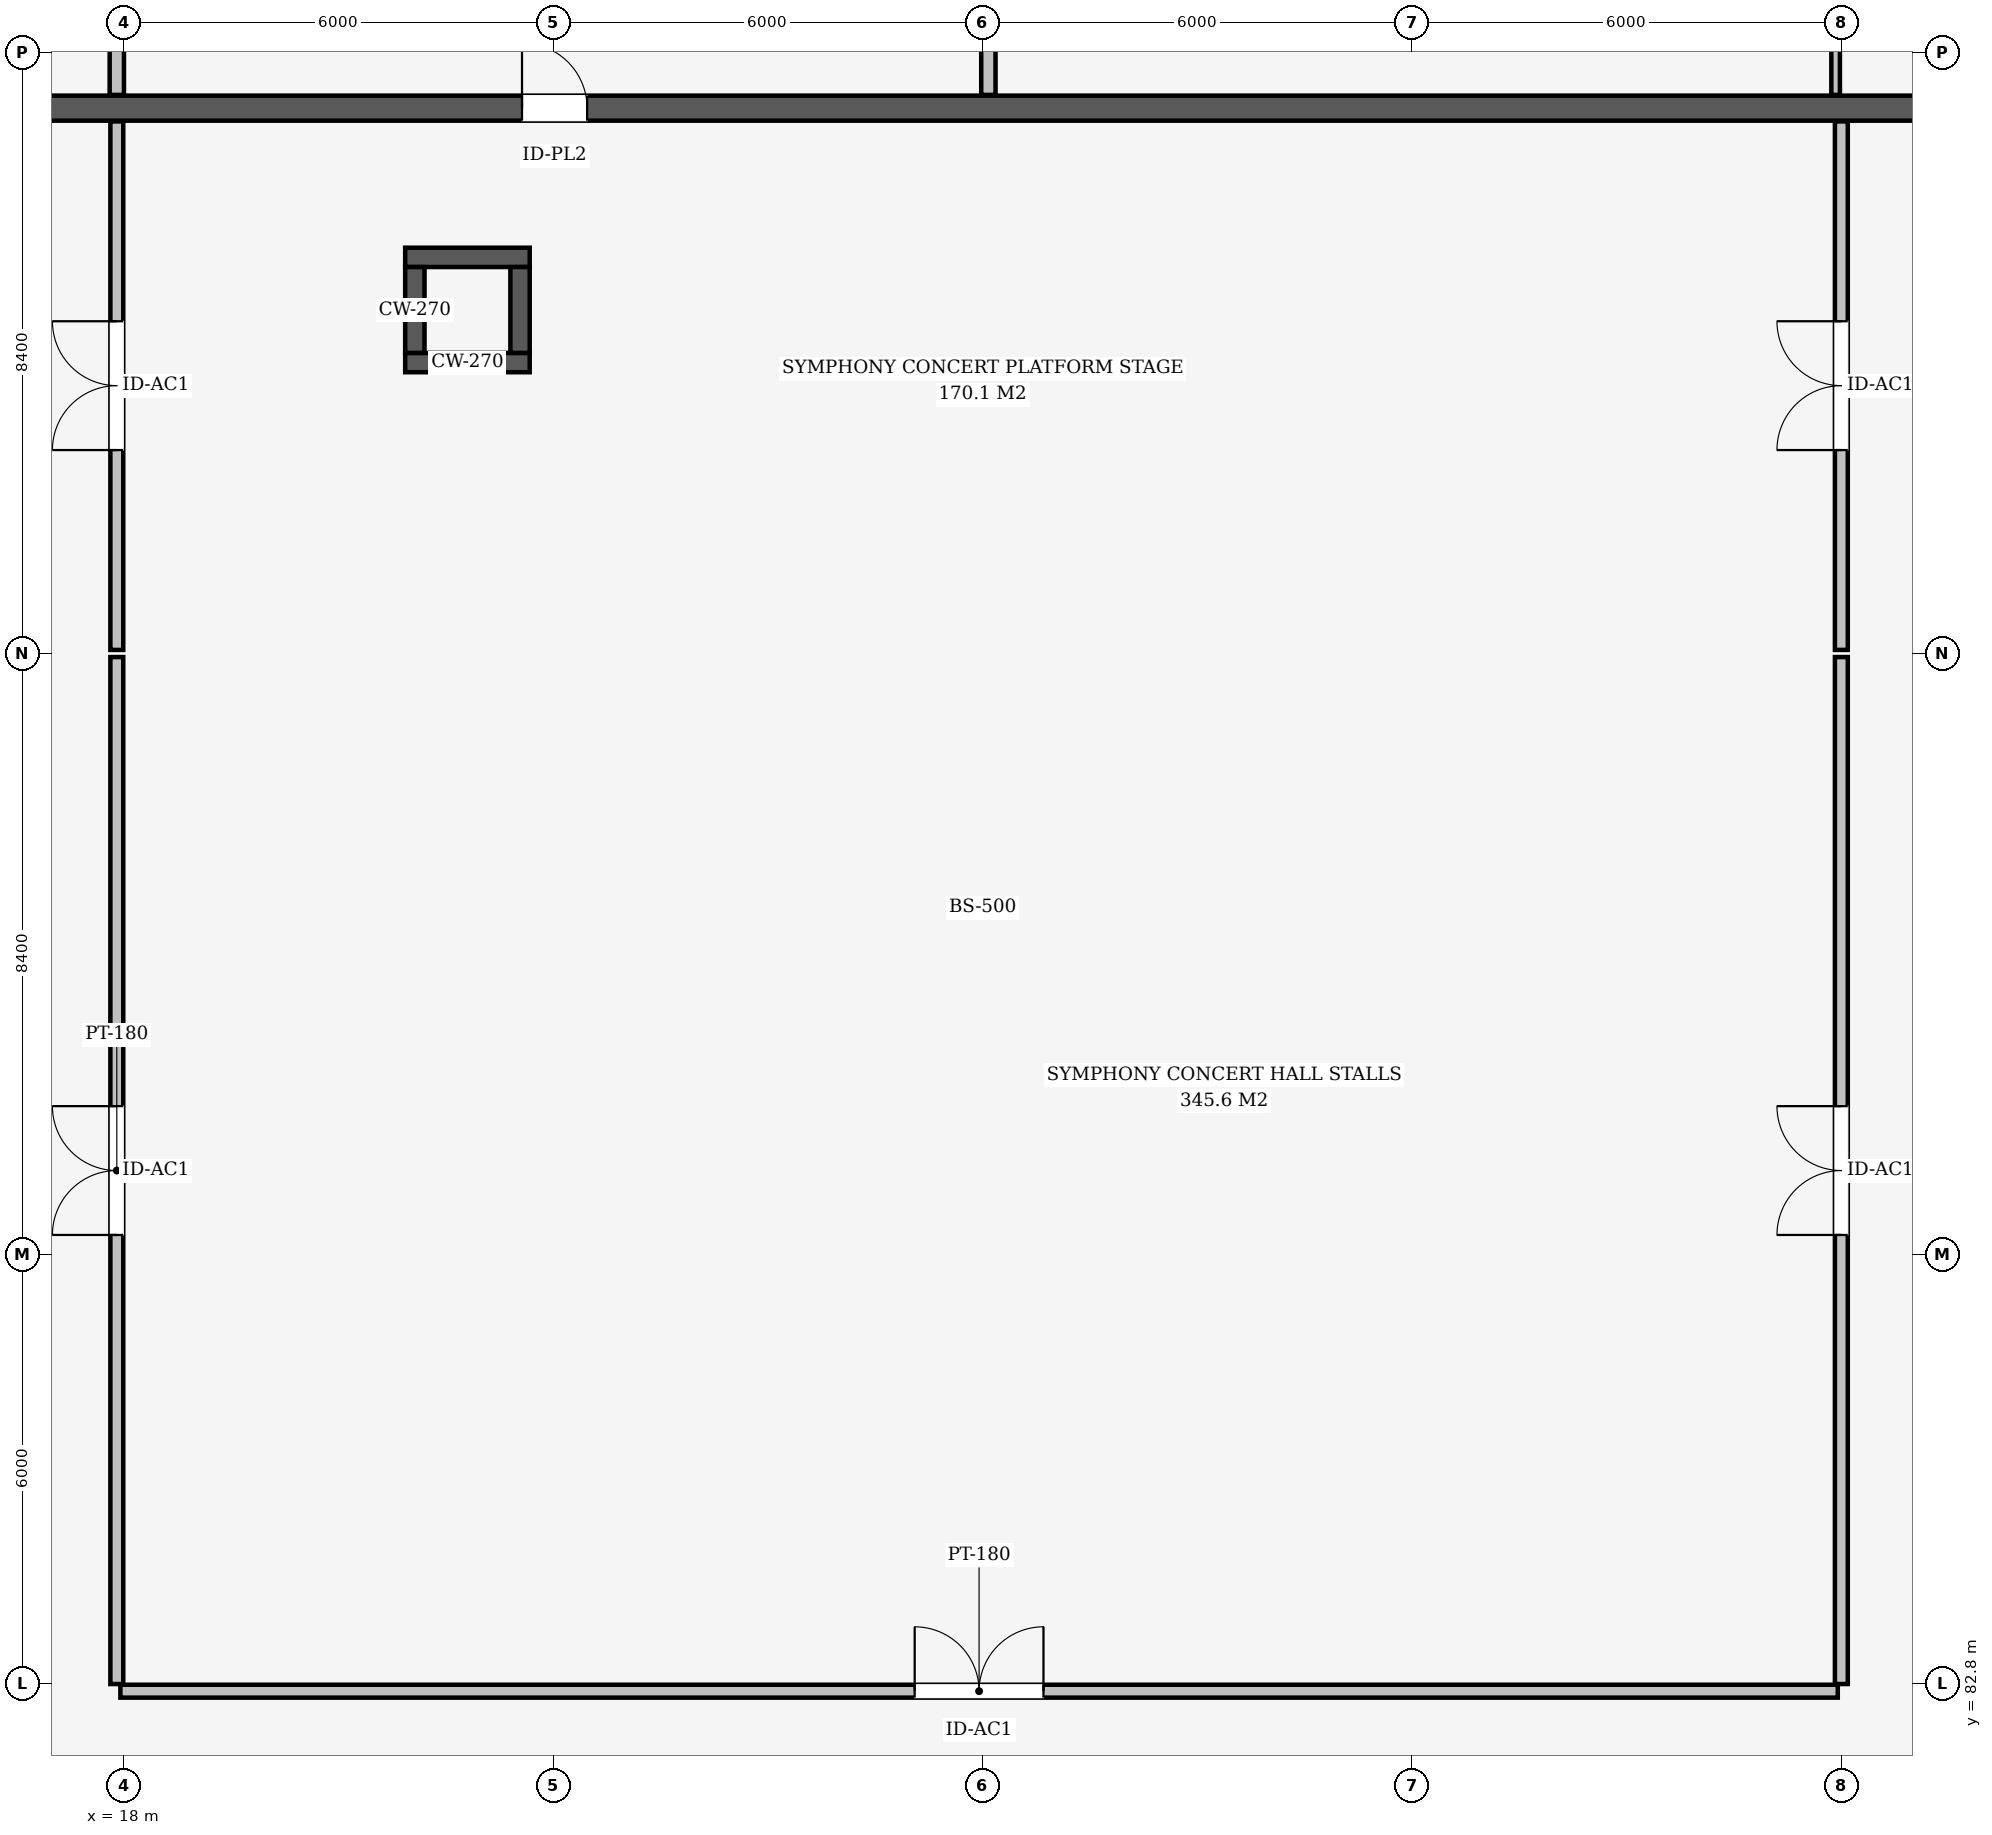
"""IFC4 building model, lengths in metres.
Left out: names, types, materials, properties, quantities, classifications, styles, units other than length and angle.
Written with IfcOpenShell. Run it as: python <this file> out.ifc"""

import sys

from ifc_helpers import new_model, si_unit, direction, frame, frame_2d, origin, place, context, subcontext, project, spatial, rectangle, extrude, element, fill, save


model = new_model("IFC4")
c1 = context("Model", 3, precision=1e-05, world=origin(), true_north=direction((0.0, 1.0)))
c2 = subcontext(c1, "Body", "Model", "MODEL_VIEW")
j1 = project(units=[si_unit("LENGTHUNIT", "METRE"), si_unit("PLANEANGLEUNIT", "RADIAN")], contexts=[c1])
p1 = place(None, origin())
s1 = spatial("IfcSite", under=j1, at=p1, CompositionType="ELEMENT")
p2 = place(p1, origin())
s2 = spatial("IfcBuilding", under=s1, at=p2, CompositionType="ELEMENT")
p3 = place(p2, origin())
s3 = spatial("IfcBuildingStorey", under=s2, at=p3, CompositionType="ELEMENT", Elevation=0.0)
p4 = place(p3, frame((12.005, 104.82, 0.0), z_axis=(0.0, 0.0, 1.0), x_axis=(1.0, 0.0, 0.0)))
e1 = element("IfcWall", 1, at=p4, inside=s3, PredefinedType="SHEAR", context=c2, shape_type="SweptSolid", body=[
    extrude(rectangle(XDim=35.99, YDim=0.35, at=frame_2d((17.995, 0.0))), origin(), (0.0, 0.0, 1.0), 4.5),
])
p5 = place(p4, frame((11.558, 0.0, 0.0)))
e2 = element("IfcOpeningElement", 2, at=p5, cuts=e1, PredefinedType="OPENING", context=c2, shape_type="SweptSolid", body=[
    extrude(rectangle(XDim=0.91, YDim=2.1, at=frame_2d((0.455, 1.05))), frame((0.0, 0.185, 0.0), z_axis=(0.0, -1.0, 0.0), x_axis=(1.0, 0.0, 0.0)), (0.0, 0.0, 1.0), 0.37),
])
for number, where, z_axis, x_axis in (
    (3, (21.93, 101.265, 0.0), (0.0, 0.0, 1.0), (1.0, 0.0, 0.0)),
    (4, (21.93, 102.735, 0.0), (0.0, 0.0, 1.0), (1.0, 0.0, 0.0)),
):
    element("IfcWall", number, at=place(p3, frame(where, z_axis=z_axis, x_axis=x_axis)), inside=s3, PredefinedType="SHEAR", context=c2, shape_type="SweptSolid", body=[
        extrude(rectangle(XDim=1.74, YDim=0.27, at=frame_2d((0.87, 0.0))), origin(), (0.0, 0.0, 1.0), 4.5),
    ])
for number, where, z_axis, x_axis in (
    (5, (22.065, 101.4, 0.0), (0.0, 0.0, 1.0), (0.0, 1.0, 0.0)),
    (6, (23.535, 101.4, 0.0), (0.0, 0.0, 1.0), (0.0, 1.0, 0.0)),
):
    element("IfcWall", number, at=place(p3, frame(where, z_axis=z_axis, x_axis=x_axis)), inside=s3, PredefinedType="SHEAR", context=c2, shape_type="SweptSolid", body=[
        extrude(rectangle(XDim=1.2, YDim=0.27, at=frame_2d((0.6, 0.0))), origin(), (0.0, 0.0, 1.0), 4.5),
    ])
p6 = place(p3, frame((17.95, 82.7, 0.0), z_axis=(0.0, 0.0, 1.0), x_axis=(1.0, 0.0, 0.0)))
e7 = element("IfcWall", 7, at=p6, inside=s3, PredefinedType="PARTITIONING", context=c2, shape_type="SweptSolid", body=[
    extrude(rectangle(XDim=24.0, YDim=0.18, at=frame_2d((12.0, 0.0))), origin(), (0.0, 0.0, 1.0), 4.8),
])
p7 = place(p6, frame((11.1, 0.0, 0.0)))
e8 = element("IfcOpeningElement", 8, at=p7, cuts=e7, PredefinedType="OPENING", context=c2, shape_type="SweptSolid", body=[
    extrude(rectangle(XDim=1.8, YDim=2.38, at=frame_2d((0.9, 1.19))), frame((0.0, 0.1, 0.0), z_axis=(0.0, -1.0, 0.0), x_axis=(1.0, 0.0, 0.0)), (0.0, 0.0, 1.0), 0.2),
])
p8 = place(p3, frame((17.9, 82.8, 0.0), z_axis=(0.0, 0.0, 1.0), x_axis=(0.0, 1.0, 0.0)))
e9 = element("IfcWall", 9, at=p8, inside=s3, PredefinedType="PARTITIONING", context=c2, shape_type="SweptSolid", body=[
    extrude(rectangle(XDim=14.35, YDim=0.18, at=frame_2d((7.175, 0.0))), origin(), (0.0, 0.0, 1.0), 4.8),
])
p9 = place(p8, frame((6.275, 0.0, 0.0)))
e10 = element("IfcOpeningElement", 10, at=p9, cuts=e9, PredefinedType="OPENING", context=c2, shape_type="SweptSolid", body=[
    extrude(rectangle(XDim=1.8, YDim=2.38, at=frame_2d((0.9, 1.19))), frame((0.0, 0.1, 0.0), z_axis=(0.0, -1.0, 0.0), x_axis=(1.0, 0.0, 0.0)), (0.0, 0.0, 1.0), 0.2),
])
p10 = place(p3, frame((42.0, 82.8, 0.0), z_axis=(0.0, 0.0, 1.0), x_axis=(0.0, 1.0, 0.0)))
e11 = element("IfcWall", 11, at=p10, inside=s3, PredefinedType="PARTITIONING", context=c2, shape_type="SweptSolid", body=[
    extrude(rectangle(XDim=14.35, YDim=0.18, at=frame_2d((7.175, 0.0))), origin(), (0.0, 0.0, 1.0), 4.8),
])
p11 = place(p10, frame((6.275, 0.0, 0.0)))
e12 = element("IfcOpeningElement", 12, at=p11, cuts=e11, PredefinedType="OPENING", context=c2, shape_type="SweptSolid", body=[
    extrude(rectangle(XDim=1.8, YDim=2.38, at=frame_2d((0.9, 1.19))), frame((0.0, 0.1, 0.0), z_axis=(0.0, -1.0, 0.0), x_axis=(1.0, 0.0, 0.0)), (0.0, 0.0, 1.0), 0.2),
])
p12 = place(p3, frame((17.9, 97.25, 0.0), z_axis=(0.0, 0.0, 1.0), x_axis=(0.0, 1.0, 0.0)))
e13 = element("IfcWall", 13, at=p12, inside=s3, PredefinedType="PARTITIONING", context=c2, shape_type="SweptSolid", body=[
    extrude(rectangle(XDim=7.385, YDim=0.18, at=frame_2d((3.692, 0.0))), origin(), (0.0, 0.0, 1.0), 4.8),
])
p13 = place(p12, frame((2.792, 0.0, 0.0)))
e14 = element("IfcOpeningElement", 14, at=p13, cuts=e13, PredefinedType="OPENING", context=c2, shape_type="SweptSolid", body=[
    extrude(rectangle(XDim=1.8, YDim=2.38, at=frame_2d((0.9, 1.19))), frame((0.0, 0.1, 0.0), z_axis=(0.0, -1.0, 0.0), x_axis=(1.0, 0.0, 0.0)), (0.0, 0.0, 1.0), 0.2),
])
p14 = place(p3, frame((42.0, 97.25, 0.0), z_axis=(0.0, 0.0, 1.0), x_axis=(0.0, 1.0, 0.0)))
e15 = element("IfcWall", 15, at=p14, inside=s3, PredefinedType="PARTITIONING", context=c2, shape_type="SweptSolid", body=[
    extrude(rectangle(XDim=7.385, YDim=0.18, at=frame_2d((3.692, 0.0))), origin(), (0.0, 0.0, 1.0), 4.8),
])
p15 = place(p14, frame((2.792, 0.0, 0.0)))
e16 = element("IfcOpeningElement", 16, at=p15, cuts=e15, PredefinedType="OPENING", context=c2, shape_type="SweptSolid", body=[
    extrude(rectangle(XDim=1.8, YDim=2.38, at=frame_2d((0.9, 1.19))), frame((0.0, 0.1, 0.0), z_axis=(0.0, -1.0, 0.0), x_axis=(1.0, 0.0, 0.0)), (0.0, 0.0, 1.0), 0.2),
])
p16 = place(p3, frame((17.9, 105.005, 0.0), z_axis=(0.0, 0.0, 1.0), x_axis=(0.0, 1.0, 0.0)))
e17 = element("IfcWall", 17, at=p16, inside=s3, PredefinedType="PARTITIONING", context=c2, shape_type="SweptSolid", body=[
    extrude(rectangle(XDim=4.79, YDim=0.2, at=frame_2d((2.395, 0.0))), origin(), (0.0, 0.0, 1.0), 4.8),
])
p17 = place(p16, frame((1.94, 0.0, 0.0)))
e18 = element("IfcOpeningElement", 18, at=p17, cuts=e17, PredefinedType="OPENING", context=c2, shape_type="SweptSolid", body=[
    extrude(rectangle(XDim=0.91, YDim=2.1, at=frame_2d((0.455, 1.05))), frame((0.0, 0.11, 0.0), z_axis=(0.0, -1.0, 0.0), x_axis=(1.0, 0.0, 0.0)), (0.0, 0.0, 1.0), 0.22),
])
p18 = place(p3, frame((30.08, 105.005, 0.0), z_axis=(0.0, 0.0, 1.0), x_axis=(0.0, 1.0, 0.0)))
e19 = element("IfcWall", 19, at=p18, inside=s3, PredefinedType="PARTITIONING", context=c2, shape_type="SweptSolid", body=[
    extrude(rectangle(XDim=5.357, YDim=0.2, at=frame_2d((2.679, 0.0))), origin(), (0.0, 0.0, 1.0), 4.48),
])
p19 = place(p3, frame((41.92, 105.005, 0.0), z_axis=(0.0, 0.0, 1.0), x_axis=(0.0, 1.0, 0.0)))
e20 = element("IfcWall", 20, at=p19, inside=s3, PredefinedType="PARTITIONING", context=c2, shape_type="SweptSolid", body=[
    extrude(rectangle(XDim=3.88, YDim=0.12, at=frame_2d((1.94, 0.0))), origin(), (0.0, 0.0, 1.0), 4.8),
])
p20 = place(p19, frame((1.46, 0.0, 0.0)))
e21 = element("IfcOpeningElement", 21, at=p20, cuts=e20, PredefinedType="OPENING", context=c2, shape_type="SweptSolid", body=[
    extrude(rectangle(XDim=0.96, YDim=2.16, at=frame_2d((0.48, 1.08))), frame((0.0, 0.07, 0.0), z_axis=(0.0, -1.0, 0.0), x_axis=(1.0, 0.0, 0.0)), (0.0, 0.0, 1.0), 0.14),
])
p21 = place(p7, origin())
e22 = element("IfcDoor", 22, at=p21, inside=s3, OperationType="DOUBLE_DOOR_SINGLE_SWING", PredefinedType="DOOR", context=c2, shape_type="SweptSolid", body=[
    extrude(rectangle(XDim=1.8, YDim=2.38, at=frame_2d((0.9, 1.19))), frame((0.0, 0.025, 0.0), z_axis=(0.0, -1.0, 0.0), x_axis=(1.0, 0.0, 0.0)), (0.0, 0.0, 1.0), 0.05),
])
fill(e8, e22)
p22 = place(p9, origin())
e23 = element("IfcDoor", 23, at=p22, inside=s3, OperationType="DOUBLE_DOOR_SINGLE_SWING", PredefinedType="DOOR", context=c2, shape_type="SweptSolid", body=[
    extrude(rectangle(XDim=1.8, YDim=2.38, at=frame_2d((0.9, 1.19))), frame((0.0, 0.025, 0.0), z_axis=(0.0, -1.0, 0.0), x_axis=(1.0, 0.0, 0.0)), (0.0, 0.0, 1.0), 0.05),
])
fill(e10, e23)
p23 = place(p11, origin())
e24 = element("IfcDoor", 24, at=p23, inside=s3, OperationType="DOUBLE_DOOR_SINGLE_SWING", PredefinedType="DOOR", context=c2, shape_type="SweptSolid", body=[
    extrude(rectangle(XDim=1.8, YDim=2.38, at=frame_2d((0.9, 1.19))), frame((0.0, 0.025, 0.0), z_axis=(0.0, -1.0, 0.0), x_axis=(1.0, 0.0, 0.0)), (0.0, 0.0, 1.0), 0.05),
])
fill(e12, e24)
p24 = place(p13, origin())
e25 = element("IfcDoor", 25, at=p24, inside=s3, OperationType="DOUBLE_DOOR_SINGLE_SWING", PredefinedType="DOOR", context=c2, shape_type="SweptSolid", body=[
    extrude(rectangle(XDim=1.8, YDim=2.38, at=frame_2d((0.9, 1.19))), frame((0.0, 0.025, 0.0), z_axis=(0.0, -1.0, 0.0), x_axis=(1.0, 0.0, 0.0)), (0.0, 0.0, 1.0), 0.05),
])
fill(e14, e25)
p25 = place(p5, origin())
e26 = element("IfcDoor", 26, at=p25, inside=s3, OperationType="SINGLE_SWING_LEFT", PredefinedType="DOOR", context=c2, shape_type="SweptSolid", body=[
    extrude(rectangle(XDim=0.91, YDim=2.1, at=frame_2d((0.455, 1.05))), frame((0.0, 0.025, 0.0), z_axis=(0.0, -1.0, 0.0), x_axis=(1.0, 0.0, 0.0)), (0.0, 0.0, 1.0), 0.05),
])
fill(e2, e26)
p26 = place(p15, origin())
e27 = element("IfcDoor", 27, at=p26, inside=s3, OperationType="DOUBLE_DOOR_SINGLE_SWING", PredefinedType="DOOR", context=c2, shape_type="SweptSolid", body=[
    extrude(rectangle(XDim=1.8, YDim=2.38, at=frame_2d((0.9, 1.19))), frame((0.0, 0.025, 0.0), z_axis=(0.0, -1.0, 0.0), x_axis=(1.0, 0.0, 0.0)), (0.0, 0.0, 1.0), 0.05),
])
fill(e16, e27)
save(model, sys.argv[1])
